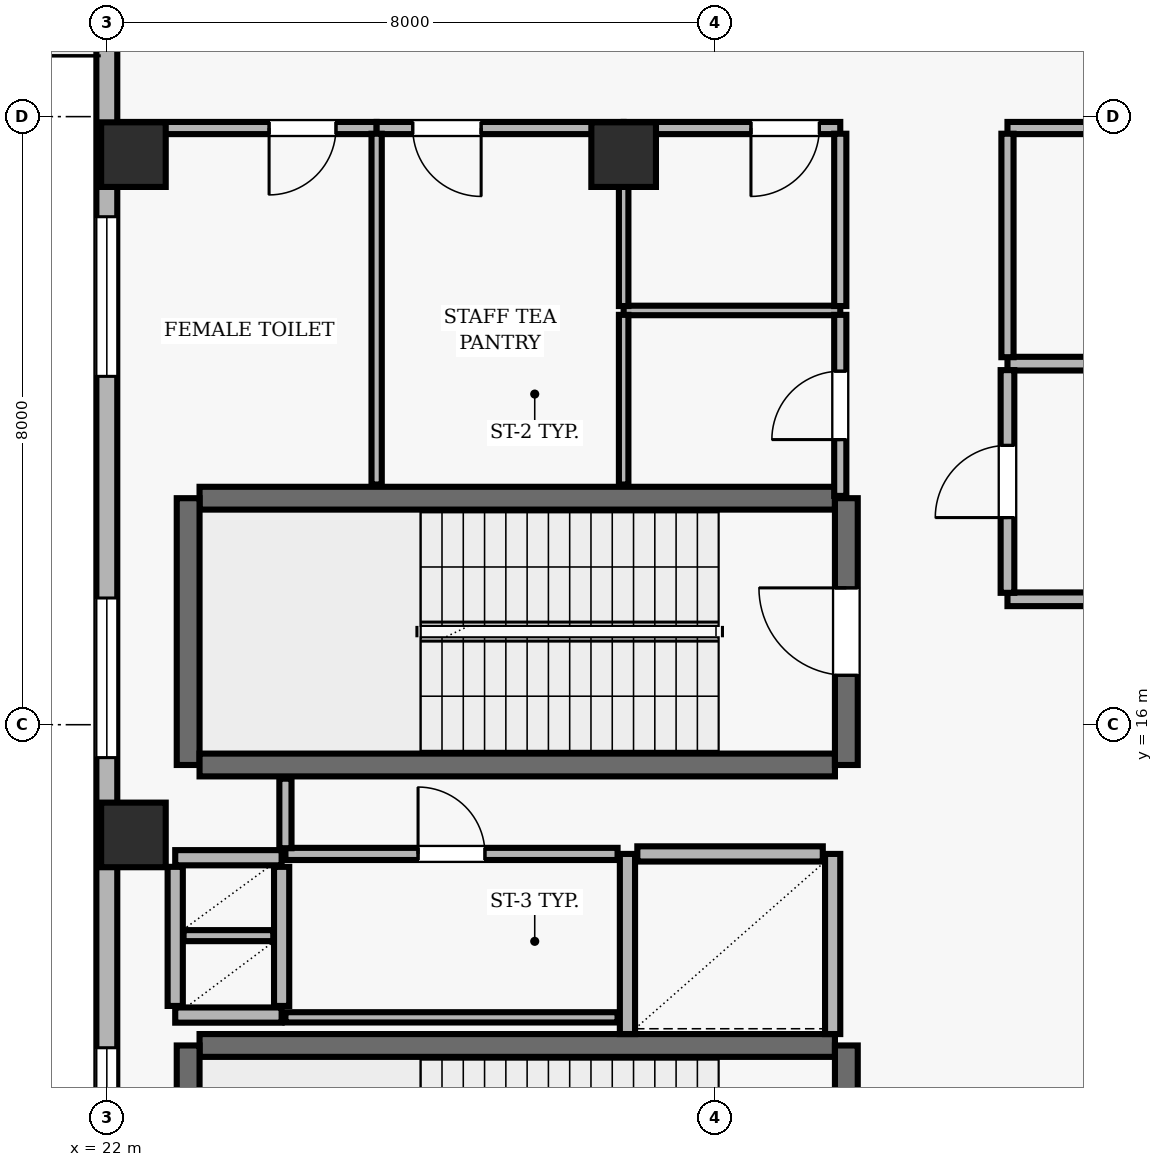
"""IFC4 building model, lengths in metres.
Left out: names, types, materials, properties, quantities, classifications, styles, units other than length and angle.
Written with IfcOpenShell. Run it as: python <this file> out.ifc"""

import sys

from ifc_helpers import new_model, si_unit, direction, frame, frame_2d, origin, origin_2d, place, context, subcontext, project, spatial, rectangle, extrude, element, fill, save


model = new_model("IFC4")
c1 = context("Model", 3, precision=1e-05, world=origin(), true_north=direction((0.0, 1.0)))
c2 = subcontext(c1, "Body", "Model", "MODEL_VIEW")
j1 = project(units=[si_unit("LENGTHUNIT", "METRE"), si_unit("PLANEANGLEUNIT", "RADIAN")], contexts=[c1])
p1 = place(None, origin())
s1 = spatial("IfcSite", under=j1, at=p1, CompositionType="ELEMENT")
p2 = place(p1, origin())
s2 = spatial("IfcBuilding", under=s1, at=p2, CompositionType="ELEMENT")
p3 = place(p2, frame((0.0, 0.0, 306.7)))
s3 = spatial("IfcBuildingStorey", under=s2, at=p3, CompositionType="ELEMENT", Elevation=306.7)
for number, where, z_axis, x_axis in (
    (1, (22.35, 14.55, 0.0), (0.0, 0.0, 1.0), (1.0, 0.0, 0.0)),
    (2, (22.35, 23.5, 0.0), (0.0, 0.0, 1.0), (1.0, 0.0, 0.0)),
    (3, (28.8, 23.5, 0.0), (0.0, 0.0, 1.0), (1.0, 0.0, 0.0)),
):
    element("IfcColumn", number, at=place(p3, frame(where, z_axis=z_axis, x_axis=x_axis)), inside=s3, PredefinedType="COLUMN", context=c2, shape_type="SweptSolid", body=[
        extrude(rectangle(XDim=0.85, YDim=0.85, at=origin_2d()), origin(), (0.0, 0.0, 1.0), 5.0),
    ])
p4 = place(p3, frame((22.0, 35.3, 0.0), z_axis=(0.0, 0.0, 1.0), x_axis=(0.0, -1.0, 0.0)))
e4 = element("IfcWall", 4, at=p4, inside=s3, PredefinedType="SOLIDWALL", context=c2, shape_type="SweptSolid", body=[
    extrude(rectangle(XDim=32.8, YDim=0.275, at=frame_2d((16.4, 0.0))), origin(), (0.0, 0.0, 1.0), 4.74),
])
p5 = place(p4, frame((7.3, 0.0, 0.0)))
e5 = element("IfcOpeningElement", 5, at=p5, cuts=e4, PredefinedType="OPENING", context=c2, shape_type="SweptSolid", body=[
    extrude(rectangle(XDim=1.0, YDim=2.2, at=frame_2d((0.5, 1.1))), frame((0.0, 0.147, 0.0), z_axis=(0.0, -1.0, 0.0), x_axis=(1.0, 0.0, 0.0)), (0.0, 0.0, 1.0), 0.295),
])
p6 = place(p4, frame((0.783, 0.0, 0.9)))
e6 = element("IfcOpeningElement", 6, at=p6, cuts=e4, PredefinedType="OPENING", context=c2, shape_type="SweptSolid", body=[
    extrude(rectangle(XDim=2.1, YDim=1.6, at=frame_2d((1.05, 0.8))), frame((0.0, 0.147, 0.0), z_axis=(0.0, -1.0, 0.0), x_axis=(1.0, 0.0, 0.0)), (0.0, 0.0, 1.0), 0.295),
])
p7 = place(p4, frame((12.617, 0.0, 0.9)))
e7 = element("IfcOpeningElement", 7, at=p7, cuts=e4, PredefinedType="OPENING", context=c2, shape_type="SweptSolid", body=[
    extrude(rectangle(XDim=2.1, YDim=1.6, at=frame_2d((1.05, 0.8))), frame((0.0, 0.147, 0.0), z_axis=(0.0, -1.0, 0.0), x_axis=(1.0, 0.0, 0.0)), (0.0, 0.0, 1.0), 0.295),
])
p8 = place(p4, frame((17.633, 0.0, 0.9)))
e8 = element("IfcOpeningElement", 8, at=p8, cuts=e4, PredefinedType="OPENING", context=c2, shape_type="SweptSolid", body=[
    extrude(rectangle(XDim=2.1, YDim=1.6, at=frame_2d((1.05, 0.8))), frame((0.0, 0.147, 0.0), z_axis=(0.0, -1.0, 0.0), x_axis=(1.0, 0.0, 0.0)), (0.0, 0.0, 1.0), 0.295),
])
p9 = place(p4, frame((23.55, 0.0, 0.9)))
e9 = element("IfcOpeningElement", 9, at=p9, cuts=e4, PredefinedType="OPENING", context=c2, shape_type="SweptSolid", body=[
    extrude(rectangle(XDim=2.1, YDim=1.6, at=frame_2d((1.05, 0.8))), frame((0.0, 0.147, 0.0), z_axis=(0.0, -1.0, 0.0), x_axis=(1.0, 0.0, 0.0)), (0.0, 0.0, 1.0), 0.295),
])
p10 = place(p3, frame((31.58, 18.98, 0.0), z_axis=(0.0, 0.0, 1.0), x_axis=(-1.0, 0.0, 0.0)))
e10 = element("IfcWall", 10, at=p10, inside=s3, PredefinedType="SHEAR", context=c2, shape_type="SweptSolid", body=[
    extrude(rectangle(XDim=8.36, YDim=0.3, at=frame_2d((4.18, 0.0))), origin(), (0.0, 0.0, 1.0), 4.74),
])
p11 = place(p3, frame((23.07, 18.98, 0.0), z_axis=(0.0, 0.0, 1.0), x_axis=(0.0, -1.0, 0.0)))
e11 = element("IfcWall", 11, at=p11, inside=s3, PredefinedType="SHEAR", context=c2, shape_type="SweptSolid", body=[
    extrude(rectangle(XDim=3.51, YDim=0.3, at=frame_2d((1.755, 0.0))), origin(), (0.0, 0.0, 1.0), 4.74),
])
p12 = place(p3, frame((23.22, 15.47, 0.0), z_axis=(0.0, 0.0, 1.0), x_axis=(1.0, 0.0, 0.0)))
e12 = element("IfcWall", 12, at=p12, inside=s3, PredefinedType="SHEAR", context=c2, shape_type="SweptSolid", body=[
    extrude(rectangle(XDim=8.36, YDim=0.3, at=frame_2d((4.18, 0.0))), origin(), (0.0, 0.0, 1.0), 4.74),
])
p13 = place(p3, frame((31.73, 15.47, 0.0), z_axis=(0.0, 0.0, 1.0), x_axis=(0.0, 1.0, 0.0)))
e13 = element("IfcWall", 13, at=p13, inside=s3, PredefinedType="SHEAR", context=c2, shape_type="SweptSolid", body=[
    extrude(rectangle(XDim=3.51, YDim=0.3, at=frame_2d((1.755, 0.0))), origin(), (0.0, 0.0, 1.0), 4.74),
])
p14 = place(p13, frame((1.18, 0.0, 0.0)))
e14 = element("IfcOpeningElement", 14, at=p14, cuts=e13, PredefinedType="OPENING", context=c2, shape_type="SweptSolid", body=[
    extrude(rectangle(XDim=1.15, YDim=2.15, at=frame_2d((0.575, 1.075))), frame((0.0, 0.16, 0.0), z_axis=(0.0, -1.0, 0.0), x_axis=(1.0, 0.0, 0.0)), (0.0, 0.0, 1.0), 0.32),
])
p15 = place(p3, frame((31.58, 11.78, 0.0), z_axis=(0.0, 0.0, 1.0), x_axis=(-1.0, 0.0, 0.0)))
e15 = element("IfcWall", 15, at=p15, inside=s3, PredefinedType="SHEAR", context=c2, shape_type="SweptSolid", body=[
    extrude(rectangle(XDim=8.36, YDim=0.3, at=frame_2d((4.18, 0.0))), origin(), (0.0, 0.0, 1.0), 4.74),
])
p16 = place(p3, frame((23.07, 11.78, 0.0), z_axis=(0.0, 0.0, 1.0), x_axis=(0.0, -1.0, 0.0)))
e16 = element("IfcWall", 16, at=p16, inside=s3, PredefinedType="SHEAR", context=c2, shape_type="SweptSolid", body=[
    extrude(rectangle(XDim=3.51, YDim=0.3, at=frame_2d((1.755, 0.0))), origin(), (0.0, 0.0, 1.0), 4.74),
])
p17 = place(p3, frame((31.73, 8.27, 0.0), z_axis=(0.0, 0.0, 1.0), x_axis=(0.0, 1.0, 0.0)))
e17 = element("IfcWall", 17, at=p17, inside=s3, PredefinedType="SHEAR", context=c2, shape_type="SweptSolid", body=[
    extrude(rectangle(XDim=3.51, YDim=0.3, at=frame_2d((1.755, 0.0))), origin(), (0.0, 0.0, 1.0), 4.74),
])
p18 = place(p17, frame((1.18, 0.0, 0.0)))
e18 = element("IfcOpeningElement", 18, at=p18, cuts=e17, PredefinedType="OPENING", context=c2, shape_type="SweptSolid", body=[
    extrude(rectangle(XDim=1.15, YDim=2.15, at=frame_2d((0.575, 1.075))), frame((0.0, 0.16, 0.0), z_axis=(0.0, -1.0, 0.0), x_axis=(1.0, 0.0, 0.0)), (0.0, 0.0, 1.0), 0.32),
])
for number, where, z_axis, x_axis in (
    (19, (28.85, 14.3, 0.0), (0.0, 0.0, 1.0), (0.0, -1.0, 0.0)),
    (20, (31.55, 11.93, 0.0), (0.0, 0.0, 1.0), (0.0, 1.0, 0.0)),
):
    element("IfcWall", number, at=place(p3, frame(where, z_axis=z_axis, x_axis=x_axis)), inside=s3, PredefinedType="SOLIDWALL", context=c2, shape_type="SweptSolid", body=[
        extrude(rectangle(XDim=2.37, YDim=0.2, at=frame_2d((1.185, 0.0))), origin(), (0.0, 0.0, 1.0), 4.74),
    ])
p19 = place(p3, frame((31.42, 14.3, 0.0), z_axis=(0.0, 0.0, 1.0), x_axis=(-1.0, 0.0, 0.0)))
e21 = element("IfcWall", 21, at=p19, inside=s3, PredefinedType="SOLIDWALL", context=c2, shape_type="SweptSolid", body=[
    extrude(rectangle(XDim=2.44, YDim=0.2, at=frame_2d((1.22, 0.0))), origin(), (0.0, 0.0, 1.0), 4.74),
])
for number, where, z_axis, x_axis in (
    (22, (22.9, 14.25, 0.0), (0.0, 0.0, 1.0), (1.0, 0.0, 0.0)),
    (23, (22.9, 12.18, 0.0), (0.0, 0.0, 1.0), (1.0, 0.0, 0.0)),
):
    element("IfcWall", number, at=place(p3, frame(where, z_axis=z_axis, x_axis=x_axis)), inside=s3, PredefinedType="SOLIDWALL", context=c2, shape_type="SweptSolid", body=[
        extrude(rectangle(XDim=1.4, YDim=0.2, at=frame_2d((0.7, 0.0))), origin(), (0.0, 0.0, 1.0), 4.74),
    ])
for number, where, z_axis, x_axis in (
    (24, (24.3, 12.3, 0.0), (0.0, 0.0, 1.0), (0.0, 1.0, 0.0)),
    (25, (22.9, 12.3, 0.0), (0.0, 0.0, 1.0), (0.0, 1.0, 0.0)),
):
    element("IfcWall", number, at=place(p3, frame(where, z_axis=z_axis, x_axis=x_axis)), inside=s3, PredefinedType="SOLIDWALL", context=c2, shape_type="SweptSolid", body=[
        extrude(rectangle(XDim=1.83, YDim=0.2, at=frame_2d((0.915, 0.0))), origin(), (0.0, 0.0, 1.0), 4.74),
    ])
p20 = place(p3, frame((23.01, 13.225, 0.0), z_axis=(0.0, 0.0, 1.0), x_axis=(1.0, 0.0, 0.0)))
e26 = element("IfcWall", 26, at=p20, inside=s3, PredefinedType="PARTITIONING", context=c2, shape_type="SweptSolid", body=[
    extrude(rectangle(XDim=1.18, YDim=0.145, at=frame_2d((0.59, 0.0))), origin(), (0.0, 0.0, 1.0), 4.74),
])
p21 = place(p3, frame((24.35, 12.15, 0.0), z_axis=(0.0, 0.0, 1.0), x_axis=(1.0, 0.0, 0.0)))
e27 = element("IfcWall", 27, at=p21, inside=s3, PredefinedType="PARTITIONING", context=c2, shape_type="SweptSolid", body=[
    extrude(rectangle(XDim=4.37, YDim=0.135, at=frame_2d((2.185, 0.0))), origin(), (0.0, 0.0, 1.0), 4.74),
])
p22 = place(p3, frame((24.35, 14.3, 0.0), z_axis=(0.0, 0.0, 1.0), x_axis=(1.0, 0.0, 0.0)))
e28 = element("IfcWall", 28, at=p22, inside=s3, PredefinedType="PARTITIONING", context=c2, shape_type="SweptSolid", body=[
    extrude(rectangle(XDim=4.37, YDim=0.16, at=frame_2d((2.185, 0.0))), origin(), (0.0, 0.0, 1.0), 4.74),
])
p23 = place(p22, frame((1.745, 0.0, 0.0)))
e29 = element("IfcOpeningElement", 29, at=p23, cuts=e28, PredefinedType="OPENING", context=c2, shape_type="SweptSolid", body=[
    extrude(rectangle(XDim=0.88, YDim=2.1, at=frame_2d((0.44, 1.05))), frame((0.0, 0.09, 0.0), z_axis=(0.0, -1.0, 0.0), x_axis=(1.0, 0.0, 0.0)), (0.0, 0.0, 1.0), 0.18),
])
p24 = place(p3, frame((25.55, 23.85, 0.0), z_axis=(0.0, 0.0, 1.0), x_axis=(-1.0, 0.0, 0.0)))
e30 = element("IfcWall", 30, at=p24, inside=s3, PredefinedType="PARTITIONING", context=c2, shape_type="SweptSolid", body=[
    extrude(rectangle(XDim=3.35, YDim=0.16, at=frame_2d((1.675, 0.0))), origin(), (0.0, 0.0, 1.0), 4.277),
])
p25 = place(p24, frame((0.535, 0.0, 0.0)))
e31 = element("IfcOpeningElement", 31, at=p25, cuts=e30, PredefinedType="OPENING", context=c2, shape_type="SweptSolid", body=[
    extrude(rectangle(XDim=0.88, YDim=2.1, at=frame_2d((0.44, 1.05))), frame((0.0, 0.09, 0.0), z_axis=(0.0, -1.0, 0.0), x_axis=(1.0, 0.0, 0.0)), (0.0, 0.0, 1.0), 0.18),
])
p26 = place(p3, frame((28.8, 23.85, 0.0), z_axis=(0.0, 0.0, 1.0), x_axis=(-1.0, 0.0, 0.0)))
e32 = element("IfcWall", 32, at=p26, inside=s3, PredefinedType="PARTITIONING", context=c2, shape_type="SweptSolid", body=[
    extrude(rectangle(XDim=3.25, YDim=0.16, at=frame_2d((1.625, 0.0))), origin(), (0.0, 0.0, 1.0), 4.277),
])
p27 = place(p26, frame((1.875, 0.0, 0.0)))
e33 = element("IfcOpeningElement", 33, at=p27, cuts=e32, PredefinedType="OPENING", context=c2, shape_type="SweptSolid", body=[
    extrude(rectangle(XDim=0.9, YDim=2.1, at=frame_2d((0.45, 1.05))), frame((0.0, 0.09, 0.0), z_axis=(0.0, -1.0, 0.0), x_axis=(1.0, 0.0, 0.0)), (0.0, 0.0, 1.0), 0.18),
])
p28 = place(p3, frame((31.65, 21.45, 0.0), z_axis=(0.0, 0.0, 1.0), x_axis=(-1.0, 0.0, 0.0)))
e34 = element("IfcWall", 34, at=p28, inside=s3, PredefinedType="PARTITIONING", context=c2, shape_type="SweptSolid", body=[
    extrude(rectangle(XDim=2.85, YDim=0.125, at=frame_2d((1.425, 0.0))), origin(), (0.0, 0.0, 1.0), 4.74),
])
p29 = place(p3, frame((31.65, 23.85, 0.0), z_axis=(0.0, 0.0, 1.0), x_axis=(-1.0, 0.0, 0.0)))
e35 = element("IfcWall", 35, at=p29, inside=s3, PredefinedType="PARTITIONING", context=c2, shape_type="SweptSolid", body=[
    extrude(rectangle(XDim=2.85, YDim=0.16, at=frame_2d((1.425, 0.0))), origin(), (0.0, 0.0, 1.0), 4.277),
])
p30 = place(p29, frame((0.275, 0.0, 0.0)))
e36 = element("IfcOpeningElement", 36, at=p30, cuts=e35, PredefinedType="OPENING", context=c2, shape_type="SweptSolid", body=[
    extrude(rectangle(XDim=0.9, YDim=2.1, at=frame_2d((0.45, 1.05))), frame((0.0, 0.09, 0.0), z_axis=(0.0, -1.0, 0.0), x_axis=(1.0, 0.0, 0.0)), (0.0, 0.0, 1.0), 0.18),
])
p31 = place(p3, frame((33.85, 17.65, 0.0), z_axis=(0.0, 0.0, 1.0), x_axis=(1.0, 0.0, 0.0)))
e37 = element("IfcWall", 37, at=p31, inside=s3, PredefinedType="PARTITIONING", context=c2, shape_type="SweptSolid", body=[
    extrude(rectangle(XDim=1.3, YDim=0.18, at=frame_2d((0.65, 0.0))), origin(), (0.0, 0.0, 1.0), 4.74),
])
p32 = place(p3, frame((37.85, 20.75, 0.0), z_axis=(0.0, 0.0, 1.0), x_axis=(-1.0, 0.0, 0.0)))
e38 = element("IfcWall", 38, at=p32, inside=s3, PredefinedType="PARTITIONING", context=c2, shape_type="SweptSolid", body=[
    extrude(rectangle(XDim=4.0, YDim=0.18, at=frame_2d((2.0, 0.0))), origin(), (0.0, 0.0, 1.0), 4.74),
])
p33 = place(p3, frame((37.85, 23.85, 0.0), z_axis=(0.0, 0.0, 1.0), x_axis=(-1.0, 0.0, 0.0)))
e39 = element("IfcWall", 39, at=p33, inside=s3, PredefinedType="PARTITIONING", context=c2, shape_type="SweptSolid", body=[
    extrude(rectangle(XDim=4.0, YDim=0.16, at=frame_2d((2.0, 0.0))), origin(), (0.0, 0.0, 1.0), 4.277),
])
p34 = place(p33, frame((1.9, 0.0, 0.0)))
e40 = element("IfcOpeningElement", 40, at=p34, cuts=e39, PredefinedType="OPENING", context=c2, shape_type="SweptSolid", body=[
    extrude(rectangle(XDim=0.9, YDim=2.1, at=frame_2d((0.45, 1.05))), frame((0.0, 0.09, 0.0), z_axis=(0.0, -1.0, 0.0), x_axis=(1.0, 0.0, 0.0)), (0.0, 0.0, 1.0), 0.18),
])
p35 = place(p3, frame((24.35, 15.29, 0.0), z_axis=(0.0, 0.0, 1.0), x_axis=(0.0, -1.0, 0.0)))
e41 = element("IfcWall", 41, at=p35, inside=s3, PredefinedType="PARTITIONING", context=c2, shape_type="SweptSolid", body=[
    extrude(rectangle(XDim=0.915, YDim=0.16, at=frame_2d((0.458, 0.0))), origin(), (0.0, 0.0, 1.0), 4.74),
])
p36 = place(p3, frame((25.55, 19.16, 0.0), z_axis=(0.0, 0.0, 1.0), x_axis=(0.0, 1.0, 0.0)))
e42 = element("IfcWall", 42, at=p36, inside=s3, PredefinedType="PARTITIONING", context=c2, shape_type="SweptSolid", body=[
    extrude(rectangle(XDim=4.615, YDim=0.135, at=frame_2d((2.308, 0.0))), origin(), (0.0, 0.0, 1.0), 4.74),
])
p37 = place(p3, frame((28.8, 21.392, 0.0), z_axis=(0.0, 0.0, 1.0), x_axis=(0.0, -1.0, 0.0)))
e43 = element("IfcWall", 43, at=p37, inside=s3, PredefinedType="PARTITIONING", context=c2, shape_type="SweptSolid", body=[
    extrude(rectangle(XDim=2.232, YDim=0.125, at=frame_2d((1.116, 0.0))), origin(), (0.0, 0.0, 1.0), 4.74),
])
p38 = place(p3, frame((28.8, 23.775, 0.0), z_axis=(0.0, 0.0, 1.0), x_axis=(0.0, -1.0, 0.0)))
e44 = element("IfcWall", 44, at=p38, inside=s3, PredefinedType="PARTITIONING", context=c2, shape_type="SweptSolid", body=[
    extrude(rectangle(XDim=2.267, YDim=0.125, at=frame_2d((1.133, 0.0))), origin(), (0.0, 0.0, 1.0), 4.74),
])
p39 = place(p3, frame((31.65, 19.01, 0.0), z_axis=(0.0, 0.0, 1.0), x_axis=(0.0, 1.0, 0.0)))
e45 = element("IfcWall", 45, at=p39, inside=s3, PredefinedType="PARTITIONING", context=c2, shape_type="SweptSolid", body=[
    extrude(rectangle(XDim=2.382, YDim=0.16, at=frame_2d((1.191, 0.0))), origin(), (0.0, 0.0, 1.0), 4.74),
])
p40 = place(p39, frame((0.741, 0.0, 0.0)))
e46 = element("IfcOpeningElement", 46, at=p40, cuts=e45, PredefinedType="OPENING", context=c2, shape_type="SweptSolid", body=[
    extrude(rectangle(XDim=0.9, YDim=2.1, at=frame_2d((0.45, 1.05))), frame((0.0, 0.09, 0.0), z_axis=(0.0, -1.0, 0.0), x_axis=(1.0, 0.0, 0.0)), (0.0, 0.0, 1.0), 0.18),
])
p41 = place(p3, frame((31.65, 23.775, 0.0), z_axis=(0.0, 0.0, 1.0), x_axis=(0.0, -1.0, 0.0)))
e47 = element("IfcWall", 47, at=p41, inside=s3, PredefinedType="PARTITIONING", context=c2, shape_type="SweptSolid", body=[
    extrude(rectangle(XDim=2.267, YDim=0.16, at=frame_2d((1.133, 0.0))), origin(), (0.0, 0.0, 1.0), 4.74),
])
p42 = place(p3, frame((33.85, 17.735, 0.0), z_axis=(0.0, 0.0, 1.0), x_axis=(0.0, 1.0, 0.0)))
e48 = element("IfcWall", 48, at=p42, inside=s3, PredefinedType="PARTITIONING", context=c2, shape_type="SweptSolid", body=[
    extrude(rectangle(XDim=2.93, YDim=0.18, at=frame_2d((1.465, 0.0))), origin(), (0.0, 0.0, 1.0), 4.74),
])
p43 = place(p42, frame((0.99, 0.0, 0.0)))
e49 = element("IfcOpeningElement", 49, at=p43, cuts=e48, PredefinedType="OPENING", context=c2, shape_type="SweptSolid", body=[
    extrude(rectangle(XDim=0.95, YDim=2.1, at=frame_2d((0.475, 1.05))), frame((0.0, 0.1, 0.0), z_axis=(0.0, -1.0, 0.0), x_axis=(1.0, 0.0, 0.0)), (0.0, 0.0, 1.0), 0.2),
])
p44 = place(p3, frame((33.85, 20.835, 0.0), z_axis=(0.0, 0.0, 1.0), x_axis=(0.0, 1.0, 0.0)))
e50 = element("IfcWall", 50, at=p44, inside=s3, PredefinedType="PARTITIONING", context=c2, shape_type="SweptSolid", body=[
    extrude(rectangle(XDim=2.94, YDim=0.16, at=frame_2d((1.47, 0.0))), origin(), (0.0, 0.0, 1.0), 4.74),
])
p45 = place(p7, origin())
e51 = element("IfcWindow", 51, at=p45, inside=s3, PartitioningType="SINGLE_PANEL", PredefinedType="WINDOW", context=c2, shape_type="SweptSolid", body=[
    extrude(rectangle(XDim=2.1, YDim=1.6, at=frame_2d((1.05, 0.8))), frame((0.0, 0.03, 0.0), z_axis=(0.0, -1.0, 0.0), x_axis=(1.0, 0.0, 0.0)), (0.0, 0.0, 1.0), 0.06),
])
fill(e7, e51)
p46 = place(p8, origin())
e52 = element("IfcWindow", 52, at=p46, inside=s3, PartitioningType="SINGLE_PANEL", PredefinedType="WINDOW", context=c2, shape_type="SweptSolid", body=[
    extrude(rectangle(XDim=2.1, YDim=1.6, at=frame_2d((1.05, 0.8))), frame((0.0, 0.03, 0.0), z_axis=(0.0, -1.0, 0.0), x_axis=(1.0, 0.0, 0.0)), (0.0, 0.0, 1.0), 0.06),
])
fill(e8, e52)
p47 = place(p9, origin())
e53 = element("IfcWindow", 53, at=p47, inside=s3, PartitioningType="SINGLE_PANEL", PredefinedType="WINDOW", context=c2, shape_type="SweptSolid", body=[
    extrude(rectangle(XDim=2.1, YDim=1.6, at=frame_2d((1.05, 0.8))), frame((0.0, 0.03, 0.0), z_axis=(0.0, -1.0, 0.0), x_axis=(1.0, 0.0, 0.0)), (0.0, 0.0, 1.0), 0.06),
])
fill(e9, e53)
p48 = place(p14, origin())
e54 = element("IfcDoor", 54, at=p48, inside=s3, OperationType="SINGLE_SWING_RIGHT", PredefinedType="DOOR", context=c2, shape_type="SweptSolid", body=[
    extrude(rectangle(XDim=1.15, YDim=2.15, at=frame_2d((0.575, 1.075))), frame((0.0, 0.025, 0.0), z_axis=(0.0, -1.0, 0.0), x_axis=(1.0, 0.0, 0.0)), (0.0, 0.0, 1.0), 0.05),
])
fill(e14, e54)
p49 = place(p43, origin())
e55 = element("IfcDoor", 55, at=p49, inside=s3, OperationType="SINGLE_SWING_LEFT", PredefinedType="DOOR", context=c2, shape_type="SweptSolid", body=[
    extrude(rectangle(XDim=0.95, YDim=2.1, at=frame_2d((0.475, 1.05))), frame((0.0, 0.025, 0.0), z_axis=(0.0, -1.0, 0.0), x_axis=(1.0, 0.0, 0.0)), (0.0, 0.0, 1.0), 0.05),
])
fill(e49, e55)
p50 = place(p40, origin())
e56 = element("IfcDoor", 56, at=p50, inside=s3, OperationType="SINGLE_SWING_LEFT", PredefinedType="DOOR", context=c2, shape_type="SweptSolid", body=[
    extrude(rectangle(XDim=0.9, YDim=2.1, at=frame_2d((0.45, 1.05))), frame((0.0, 0.025, 0.0), z_axis=(0.0, -1.0, 0.0), x_axis=(1.0, 0.0, 0.0)), (0.0, 0.0, 1.0), 0.05),
])
fill(e46, e56)
p51 = place(p30, origin())
e57 = element("IfcDoor", 57, at=p51, inside=s3, OperationType="SINGLE_SWING_RIGHT", PredefinedType="DOOR", context=c2, shape_type="SweptSolid", body=[
    extrude(rectangle(XDim=0.9, YDim=2.1, at=frame_2d((0.45, 1.05))), frame((0.0, 0.025, 0.0), z_axis=(0.0, -1.0, 0.0), x_axis=(1.0, 0.0, 0.0)), (0.0, 0.0, 1.0), 0.05),
])
fill(e36, e57)
p52 = place(p23, origin())
e58 = element("IfcDoor", 58, at=p52, inside=s3, OperationType="SINGLE_SWING_LEFT", PredefinedType="DOOR", context=c2, shape_type="SweptSolid", body=[
    extrude(rectangle(XDim=0.88, YDim=2.1, at=frame_2d((0.44, 1.05))), frame((0.0, 0.025, 0.0), z_axis=(0.0, -1.0, 0.0), x_axis=(1.0, 0.0, 0.0)), (0.0, 0.0, 1.0), 0.05),
])
fill(e29, e58)
p53 = place(p25, origin())
e59 = element("IfcDoor", 59, at=p53, inside=s3, OperationType="SINGLE_SWING_RIGHT", PredefinedType="DOOR", context=c2, shape_type="SweptSolid", body=[
    extrude(rectangle(XDim=0.88, YDim=2.1, at=frame_2d((0.44, 1.05))), frame((0.0, 0.025, 0.0), z_axis=(0.0, -1.0, 0.0), x_axis=(1.0, 0.0, 0.0)), (0.0, 0.0, 1.0), 0.05),
])
fill(e31, e59)
p54 = place(p27, origin())
e60 = element("IfcDoor", 60, at=p54, inside=s3, OperationType="SINGLE_SWING_LEFT", PredefinedType="DOOR", context=c2, shape_type="SweptSolid", body=[
    extrude(rectangle(XDim=0.9, YDim=2.1, at=frame_2d((0.45, 1.05))), frame((0.0, 0.025, 0.0), z_axis=(0.0, -1.0, 0.0), x_axis=(1.0, 0.0, 0.0)), (0.0, 0.0, 1.0), 0.05),
])
fill(e33, e60)
save(model, sys.argv[1])
